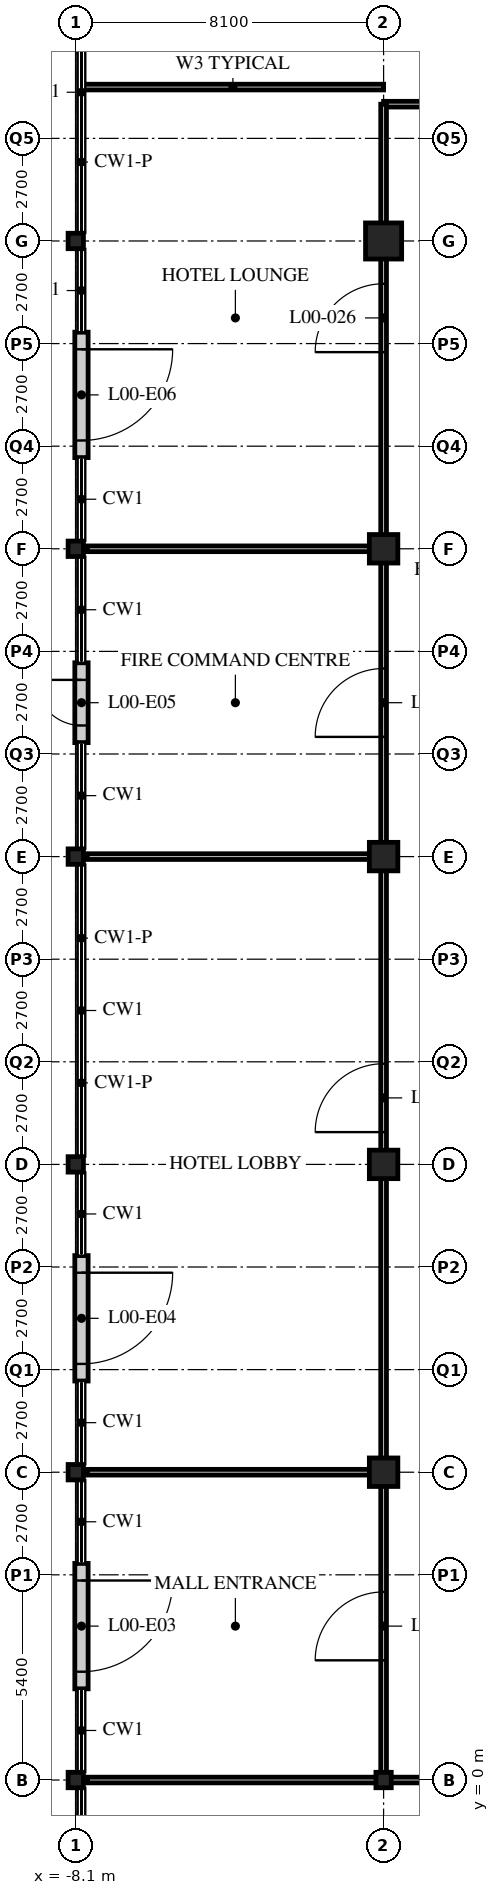
"""IFC4 building model, lengths in metres.
Left out: names, types, materials, properties, quantities, classifications, styles, units other than length and angle.
Written with IfcOpenShell. Run it as: python <this file> out.ifc"""

import sys

from ifc_helpers import new_model, si_unit, direction, frame, frame_2d, origin, origin_with_axes, origin_2d, place, context, subcontext, project, spatial, rectangle, hollow_rectangle, i_section, extrude, element, fill, save


model = new_model("IFC4")
c1 = context("Model", 3, precision=1e-05, world=origin(), true_north=direction((0.0, 1.0)))
c2 = subcontext(c1, "Body", "Model", "MODEL_VIEW")
j1 = project(units=[si_unit("LENGTHUNIT", "METRE"), si_unit("PLANEANGLEUNIT", "RADIAN")], contexts=[c1])
p1 = place(None, origin())
s1 = spatial("IfcSite", under=j1, at=p1, CompositionType="ELEMENT")
p2 = place(p1, origin())
s2 = spatial("IfcBuilding", under=s1, at=p2, CompositionType="ELEMENT")
p3 = place(p2, origin())
s3 = spatial("IfcBuildingStorey", under=s2, at=p3, CompositionType="ELEMENT", Elevation=0.0)
for number, where, z_axis, x_axis in (
    (1, (-8.1, 0.0, 0.0), (0.0, 0.0, 1.0), (1.0, 0.0, 0.0)),
    (2, (-8.1, 8.1, 0.0), (0.0, 0.0, 1.0), (1.0, 0.0, 0.0)),
    (3, (-8.1, 16.2, 0.0), (0.0, 0.0, 1.0), (1.0, 0.0, 0.0)),
    (4, (-8.1, 24.3, 0.0), (0.0, 0.0, 1.0), (1.0, 0.0, 0.0)),
    (5, (-8.1, 32.4, 0.0), (0.0, 0.0, 1.0), (1.0, 0.0, 0.0)),
    (6, (-8.1, 40.5, 0.0), (0.0, 0.0, 1.0), (1.0, 0.0, 0.0)),
    (7, (0.0, 0.0, 0.0), (0.0, 0.0, 1.0), (1.0, 0.0, 0.0)),
):
    element("IfcColumn", number, at=place(p3, frame(where, z_axis=z_axis, x_axis=x_axis)), inside=s3, PredefinedType="COLUMN", context=c2, shape_type="SweptSolid", body=[
        extrude(i_section(OverallWidth=0.403, OverallDepth=0.406, WebThickness=0.027, FlangeThickness=0.043, FilletRadius=0.015, at=origin_2d()), origin(), (0.0, 0.0, 1.0), 6.0),
    ])
for number, where, z_axis, x_axis in (
    (8, (0.0, 8.1, 0.0), (0.0, 0.0, 1.0), (1.0, 0.0, 0.0)),
    (9, (0.0, 16.2, 0.0), (0.0, 0.0, 1.0), (1.0, 0.0, 0.0)),
    (10, (0.0, 24.3, 0.0), (0.0, 0.0, 1.0), (1.0, 0.0, 0.0)),
    (11, (0.0, 32.4, 0.0), (0.0, 0.0, 1.0), (1.0, 0.0, 0.0)),
):
    element("IfcColumn", number, at=place(p3, frame(where, z_axis=z_axis, x_axis=x_axis)), inside=s3, PredefinedType="COLUMN", context=c2, shape_type="SweptSolid", body=[
        extrude(hollow_rectangle(XDim=0.75, YDim=0.75, WallThickness=0.07, at=origin_2d()), origin(), (0.0, 0.0, 1.0), 6.0),
    ])
p4 = place(p3, frame((0.0, 40.5, 0.0), z_axis=(0.0, 0.0, 1.0), x_axis=(1.0, 0.0, 0.0)))
e12 = element("IfcColumn", 12, at=p4, inside=s3, PredefinedType="COLUMN", context=c2, shape_type="SweptSolid", body=[
    extrude(hollow_rectangle(XDim=0.95, YDim=0.95, WallThickness=0.1, at=origin_2d()), origin(), (0.0, 0.0, 1.0), 6.0),
])
p5 = place(p3, frame((-7.95, 38.1, 0.0), z_axis=(0.0, 0.0, 1.0), x_axis=(0.0, -1.0, 0.0)))
e13 = element("IfcWall", 13, at=p5, inside=s3, PredefinedType="SOLIDWALL", context=c2, shape_type="SweptSolid", body=[
    extrude(rectangle(XDim=3.3, YDim=0.35, at=frame_2d((1.65, 0.0))), origin(), (0.0, 0.0, 1.0), 5.75),
])
p6 = place(p5, frame((0.45, 0.0, 0.0)))
e14 = element("IfcOpeningElement", 14, at=p6, cuts=e13, PredefinedType="OPENING", context=c2, shape_type="SweptSolid", body=[
    extrude(rectangle(XDim=2.4, YDim=2.7, at=frame_2d((1.2, 1.35))), frame((0.0, 0.185, 0.0), z_axis=(0.0, -1.0, 0.0), x_axis=(1.0, 0.0, 0.0)), (0.0, 0.0, 1.0), 0.37),
])
p7 = place(p3, frame((-7.95, 29.4, 0.0), z_axis=(0.0, 0.0, 1.0), x_axis=(0.0, -1.0, 0.0)))
e15 = element("IfcWall", 15, at=p7, inside=s3, PredefinedType="SOLIDWALL", context=c2, shape_type="SweptSolid", body=[
    extrude(rectangle(XDim=2.1, YDim=0.35, at=frame_2d((1.05, 0.0))), origin(), (0.0, 0.0, 1.0), 5.75),
])
p8 = place(p7, frame((0.45, 0.0, 0.0)))
e16 = element("IfcOpeningElement", 16, at=p8, cuts=e15, PredefinedType="OPENING", context=c2, shape_type="SweptSolid", body=[
    extrude(rectangle(XDim=1.2, YDim=2.4, at=frame_2d((0.6, 1.2))), frame((0.0, 0.185, 0.0), z_axis=(0.0, -1.0, 0.0), x_axis=(1.0, 0.0, 0.0)), (0.0, 0.0, 1.0), 0.37),
])
p9 = place(p3, frame((-7.95, 13.8, 0.0), z_axis=(0.0, 0.0, 1.0), x_axis=(0.0, -1.0, 0.0)))
e17 = element("IfcWall", 17, at=p9, inside=s3, PredefinedType="SOLIDWALL", context=c2, shape_type="SweptSolid", body=[
    extrude(rectangle(XDim=3.3, YDim=0.35, at=frame_2d((1.65, 0.0))), origin(), (0.0, 0.0, 1.0), 5.75),
])
p10 = place(p9, frame((0.45, 0.0, 0.0)))
e18 = element("IfcOpeningElement", 18, at=p10, cuts=e17, PredefinedType="OPENING", context=c2, shape_type="SweptSolid", body=[
    extrude(rectangle(XDim=2.4, YDim=2.7, at=frame_2d((1.2, 1.35))), frame((0.0, 0.185, 0.0), z_axis=(0.0, -1.0, 0.0), x_axis=(1.0, 0.0, 0.0)), (0.0, 0.0, 1.0), 0.37),
])
p11 = place(p3, frame((-7.95, 5.7, 0.0), z_axis=(0.0, 0.0, 1.0), x_axis=(0.0, -1.0, 0.0)))
e19 = element("IfcWall", 19, at=p11, inside=s3, PredefinedType="SOLIDWALL", context=c2, shape_type="SweptSolid", body=[
    extrude(rectangle(XDim=3.3, YDim=0.35, at=frame_2d((1.65, 0.0))), origin(), (0.0, 0.0, 1.0), 5.75),
])
p12 = place(p11, frame((0.45, 0.0, 0.0)))
e20 = element("IfcOpeningElement", 20, at=p12, cuts=e19, PredefinedType="OPENING", context=c2, shape_type="SweptSolid", body=[
    extrude(rectangle(XDim=2.4, YDim=2.7, at=frame_2d((1.2, 1.35))), frame((0.0, 0.185, 0.0), z_axis=(0.0, -1.0, 0.0), x_axis=(1.0, 0.0, 0.0)), (0.0, 0.0, 1.0), 0.37),
])
p13 = place(p3, origin_with_axes())
e21 = element("IfcWall", 21, at=p13, inside=s3, PredefinedType="PARTITIONING", context=c2, shape_type="SweptSolid", body=[
    extrude(rectangle(XDim=56.7, YDim=0.15, at=frame_2d((28.35, 0.0))), origin(), (0.0, 0.0, 1.0), 5.138),
])
p14 = place(p13, frame((10.95, 0.0, 0.0)))
e22 = element("IfcOpeningElement", 22, at=p14, cuts=e21, PredefinedType="OPENING", context=c2, shape_type="SweptSolid", body=[
    extrude(rectangle(XDim=2.4, YDim=2.7, at=frame_2d((1.2, 1.35))), frame((0.0, 0.085, 0.0), z_axis=(0.0, -1.0, 0.0), x_axis=(1.0, 0.0, 0.0)), (0.0, 0.0, 1.0), 0.17),
])
p15 = place(p13, frame((19.35, 0.0, 0.0)))
e23 = element("IfcOpeningElement", 23, at=p15, cuts=e21, PredefinedType="OPENING", context=c2, shape_type="SweptSolid", body=[
    extrude(rectangle(XDim=1.8, YDim=2.4, at=frame_2d((0.9, 1.2))), frame((0.0, 0.085, 0.0), z_axis=(0.0, -1.0, 0.0), x_axis=(1.0, 0.0, 0.0)), (0.0, 0.0, 1.0), 0.17),
])
p16 = place(p13, frame((27.15, 0.0, 0.0)))
e24 = element("IfcOpeningElement", 24, at=p16, cuts=e21, PredefinedType="OPENING", context=c2, shape_type="SweptSolid", body=[
    extrude(rectangle(XDim=2.4, YDim=2.7, at=frame_2d((1.2, 1.35))), frame((0.0, 0.085, 0.0), z_axis=(0.0, -1.0, 0.0), x_axis=(1.0, 0.0, 0.0)), (0.0, 0.0, 1.0), 0.17),
])
p17 = place(p13, frame((35.55, 0.0, 0.0)))
e25 = element("IfcOpeningElement", 25, at=p17, cuts=e21, PredefinedType="OPENING", context=c2, shape_type="SweptSolid", body=[
    extrude(rectangle(XDim=1.8, YDim=2.4, at=frame_2d((0.9, 1.2))), frame((0.0, 0.085, 0.0), z_axis=(0.0, -1.0, 0.0), x_axis=(1.0, 0.0, 0.0)), (0.0, 0.0, 1.0), 0.17),
])
p18 = place(p13, frame((43.35, 0.0, 0.0)))
e26 = element("IfcOpeningElement", 26, at=p18, cuts=e21, PredefinedType="OPENING", context=c2, shape_type="SweptSolid", body=[
    extrude(rectangle(XDim=2.4, YDim=2.7, at=frame_2d((1.2, 1.35))), frame((0.0, 0.085, 0.0), z_axis=(0.0, -1.0, 0.0), x_axis=(1.0, 0.0, 0.0)), (0.0, 0.0, 1.0), 0.17),
])
p19 = place(p13, frame((2.85, 0.0, 0.0)))
e27 = element("IfcOpeningElement", 27, at=p19, cuts=e21, PredefinedType="OPENING", context=c2, shape_type="SweptSolid", body=[
    extrude(rectangle(XDim=2.4, YDim=2.7, at=frame_2d((1.2, 1.35))), frame((0.0, 0.085, 0.0), z_axis=(0.0, -1.0, 0.0), x_axis=(1.0, 0.0, 0.0)), (0.0, 0.0, 1.0), 0.17),
])
p20 = place(p13, frame((51.45, 0.0, 0.0)))
e28 = element("IfcOpeningElement", 28, at=p20, cuts=e21, PredefinedType="OPENING", context=c2, shape_type="SweptSolid", body=[
    extrude(rectangle(XDim=2.4, YDim=2.7, at=frame_2d((1.2, 1.35))), frame((0.0, 0.085, 0.0), z_axis=(0.0, -1.0, 0.0), x_axis=(1.0, 0.0, 0.0)), (0.0, 0.0, 1.0), 0.17),
])
p21 = place(p3, frame((0.0, 44.1, 0.0), z_axis=(0.0, 0.0, 1.0), x_axis=(1.0, 0.0, 0.0)))
e29 = element("IfcWall", 29, at=p21, inside=s3, PredefinedType="PARTITIONING", context=c2, shape_type="SweptSolid", body=[
    extrude(rectangle(XDim=56.7, YDim=0.15, at=frame_2d((28.35, 0.0))), origin(), (0.0, 0.0, 1.0), 5.75),
])
p22 = place(p21, frame((15.3, 0.0, 0.0)))
e30 = element("IfcOpeningElement", 30, at=p22, cuts=e29, PredefinedType="OPENING", context=c2, shape_type="SweptSolid", body=[
    extrude(rectangle(XDim=1.8, YDim=2.4, at=frame_2d((0.9, 1.2))), frame((0.0, 0.085, 0.0), z_axis=(0.0, -1.0, 0.0), x_axis=(1.0, 0.0, 0.0)), (0.0, 0.0, 1.0), 0.17),
])
p23 = place(p21, frame((27.45, 0.0, 0.0)))
e31 = element("IfcOpeningElement", 31, at=p23, cuts=e29, PredefinedType="OPENING", context=c2, shape_type="SweptSolid", body=[
    extrude(rectangle(XDim=1.8, YDim=2.4, at=frame_2d((0.9, 1.2))), frame((0.0, 0.085, 0.0), z_axis=(0.0, -1.0, 0.0), x_axis=(1.0, 0.0, 0.0)), (0.0, 0.0, 1.0), 0.17),
])
p24 = place(p21, frame((39.6, 0.0, 0.0)))
e32 = element("IfcOpeningElement", 32, at=p24, cuts=e29, PredefinedType="OPENING", context=c2, shape_type="SweptSolid", body=[
    extrude(rectangle(XDim=1.8, YDim=2.4, at=frame_2d((0.9, 1.2))), frame((0.0, 0.085, 0.0), z_axis=(0.0, -1.0, 0.0), x_axis=(1.0, 0.0, 0.0)), (0.0, 0.0, 1.0), 0.17),
])
p25 = place(p21, frame((4.85, 0.0, 0.0)))
e33 = element("IfcOpeningElement", 33, at=p25, cuts=e29, PredefinedType="OPENING", context=c2, shape_type="SweptSolid", body=[
    extrude(rectangle(XDim=2.4, YDim=2.7, at=frame_2d((1.2, 1.35))), frame((0.0, 0.085, 0.0), z_axis=(0.0, -1.0, 0.0), x_axis=(1.0, 0.0, 0.0)), (0.0, 0.0, 1.0), 0.17),
])
p26 = place(p3, frame((0.0, 0.0, 0.0), z_axis=(0.0, 0.0, 1.0), x_axis=(0.0, 1.0, 0.0)))
e34 = element("IfcWall", 34, at=p26, inside=s3, PredefinedType="PARTITIONING", context=c2, shape_type="SweptSolid", body=[
    extrude(rectangle(XDim=44.1, YDim=0.15, at=frame_2d((22.05, 0.0))), origin(), (0.0, 0.0, 1.0), 5.138),
])
p27 = place(p26, frame((3.15, 0.0, 0.0)))
e35 = element("IfcOpeningElement", 35, at=p27, cuts=e34, PredefinedType="OPENING", context=c2, shape_type="SweptSolid", body=[
    extrude(rectangle(XDim=1.8, YDim=2.4, at=frame_2d((0.9, 1.2))), frame((0.0, 0.085, 0.0), z_axis=(0.0, -1.0, 0.0), x_axis=(1.0, 0.0, 0.0)), (0.0, 0.0, 1.0), 0.17),
])
p28 = place(p26, frame((17.05, 0.0, 0.0)))
e36 = element("IfcOpeningElement", 36, at=p28, cuts=e34, PredefinedType="OPENING", context=c2, shape_type="SweptSolid", body=[
    extrude(rectangle(XDim=1.8, YDim=2.4, at=frame_2d((0.9, 1.2))), frame((0.0, 0.085, 0.0), z_axis=(0.0, -1.0, 0.0), x_axis=(1.0, 0.0, 0.0)), (0.0, 0.0, 1.0), 0.17),
])
p29 = place(p26, frame((27.45, 0.0, 0.0)))
e37 = element("IfcOpeningElement", 37, at=p29, cuts=e34, PredefinedType="OPENING", context=c2, shape_type="SweptSolid", body=[
    extrude(rectangle(XDim=1.8, YDim=2.4, at=frame_2d((0.9, 1.2))), frame((0.0, 0.085, 0.0), z_axis=(0.0, -1.0, 0.0), x_axis=(1.0, 0.0, 0.0)), (0.0, 0.0, 1.0), 0.17),
])
p30 = place(p26, frame((37.575, 0.0, 0.0)))
e38 = element("IfcOpeningElement", 38, at=p30, cuts=e34, PredefinedType="OPENING", context=c2, shape_type="SweptSolid", body=[
    extrude(rectangle(XDim=1.8, YDim=2.4, at=frame_2d((0.9, 1.2))), frame((0.0, 0.085, 0.0), z_axis=(0.0, -1.0, 0.0), x_axis=(1.0, 0.0, 0.0)), (0.0, 0.0, 1.0), 0.17),
])
for number, where, z_axis, x_axis in (
    (39, (0.0, 8.1, 0.0), (0.0, 0.0, 1.0), (-1.0, 0.0, 0.0)),
    (40, (0.0, 24.3, 0.0), (0.0, 0.0, 1.0), (-1.0, 0.0, 0.0)),
    (41, (0.0, 32.4, 0.0), (0.0, 0.0, 1.0), (-1.0, 0.0, 0.0)),
    (42, (-7.8, 0.0, 0.0), (0.0, 0.0, 1.0), (1.0, 0.0, 0.0)),
):
    element("IfcWall", number, at=place(p3, frame(where, z_axis=z_axis, x_axis=x_axis)), inside=s3, PredefinedType="PARTITIONING", context=c2, shape_type="SweptSolid", body=[
        extrude(rectangle(XDim=7.8, YDim=0.15, at=frame_2d((3.9, 0.0))), origin(), (0.0, 0.0, 1.0), 5.138),
    ])
p31 = place(p3, frame((-7.931, 44.55, 0.0), z_axis=(0.0, 0.0, 1.0), x_axis=(1.0, 0.0, 0.0)))
e43 = element("IfcWall", 43, at=p31, inside=s3, PredefinedType="PARTITIONING", context=c2, shape_type="SweptSolid", body=[
    extrude(rectangle(XDim=7.931, YDim=0.15, at=frame_2d((3.965, 0.0))), origin(), (0.0, 0.0, 1.0), 5.75),
])
p32 = place(p6, origin())
e44 = element("IfcDoor", 44, at=p32, inside=s3, OperationType="DOUBLE_DOOR_SINGLE_SWING", PredefinedType="DOOR", context=c2, shape_type="SweptSolid", body=[
    extrude(rectangle(XDim=2.4, YDim=2.7, at=frame_2d((1.2, 1.35))), frame((0.0, 0.025, 0.0), z_axis=(0.0, -1.0, 0.0), x_axis=(1.0, 0.0, 0.0)), (0.0, 0.0, 1.0), 0.05),
])
fill(e14, e44)
p33 = place(p8, origin())
e45 = element("IfcDoor", 45, at=p33, inside=s3, OperationType="SINGLE_SWING_RIGHT", PredefinedType="DOOR", context=c2, shape_type="SweptSolid", body=[
    extrude(rectangle(XDim=1.2, YDim=2.4, at=frame_2d((0.6, 1.2))), frame((0.0, 0.025, 0.0), z_axis=(0.0, -1.0, 0.0), x_axis=(1.0, 0.0, 0.0)), (0.0, 0.0, 1.0), 0.05),
])
fill(e16, e45)
p34 = place(p10, origin())
e46 = element("IfcDoor", 46, at=p34, inside=s3, OperationType="DOUBLE_DOOR_SINGLE_SWING", PredefinedType="DOOR", context=c2, shape_type="SweptSolid", body=[
    extrude(rectangle(XDim=2.4, YDim=2.7, at=frame_2d((1.2, 1.35))), frame((0.0, 0.025, 0.0), z_axis=(0.0, -1.0, 0.0), x_axis=(1.0, 0.0, 0.0)), (0.0, 0.0, 1.0), 0.05),
])
fill(e18, e46)
p35 = place(p12, origin())
e47 = element("IfcDoor", 47, at=p35, inside=s3, OperationType="DOUBLE_DOOR_SINGLE_SWING", PredefinedType="DOOR", context=c2, shape_type="SweptSolid", body=[
    extrude(rectangle(XDim=2.4, YDim=2.7, at=frame_2d((1.2, 1.35))), frame((0.0, 0.025, 0.0), z_axis=(0.0, -1.0, 0.0), x_axis=(1.0, 0.0, 0.0)), (0.0, 0.0, 1.0), 0.05),
])
fill(e20, e47)
p36 = place(p27, origin())
e48 = element("IfcDoor", 48, at=p36, inside=s3, OperationType="DOUBLE_DOOR_SINGLE_SWING", PredefinedType="DOOR", context=c2, shape_type="SweptSolid", body=[
    extrude(rectangle(XDim=1.8, YDim=2.4, at=frame_2d((0.9, 1.2))), frame((0.0, 0.025, 0.0), z_axis=(0.0, -1.0, 0.0), x_axis=(1.0, 0.0, 0.0)), (0.0, 0.0, 1.0), 0.05),
])
fill(e35, e48)
p37 = place(p28, origin())
e49 = element("IfcDoor", 49, at=p37, inside=s3, OperationType="DOUBLE_DOOR_SINGLE_SWING", PredefinedType="DOOR", context=c2, shape_type="SweptSolid", body=[
    extrude(rectangle(XDim=1.8, YDim=2.4, at=frame_2d((0.9, 1.2))), frame((0.0, 0.025, 0.0), z_axis=(0.0, -1.0, 0.0), x_axis=(1.0, 0.0, 0.0)), (0.0, 0.0, 1.0), 0.05),
])
fill(e36, e49)
p38 = place(p29, origin())
e50 = element("IfcDoor", 50, at=p38, inside=s3, OperationType="DOUBLE_DOOR_SINGLE_SWING", PredefinedType="DOOR", context=c2, shape_type="SweptSolid", body=[
    extrude(rectangle(XDim=1.8, YDim=2.4, at=frame_2d((0.9, 1.2))), frame((0.0, 0.025, 0.0), z_axis=(0.0, -1.0, 0.0), x_axis=(1.0, 0.0, 0.0)), (0.0, 0.0, 1.0), 0.05),
])
fill(e37, e50)
p39 = place(p30, origin())
e51 = element("IfcDoor", 51, at=p39, inside=s3, OperationType="DOUBLE_DOOR_SINGLE_SWING", PredefinedType="DOOR", context=c2, shape_type="SweptSolid", body=[
    extrude(rectangle(XDim=1.8, YDim=2.4, at=frame_2d((0.9, 1.2))), frame((0.0, 0.025, 0.0), z_axis=(0.0, -1.0, 0.0), x_axis=(1.0, 0.0, 0.0)), (0.0, 0.0, 1.0), 0.05),
])
fill(e38, e51)
save(model, sys.argv[1])
